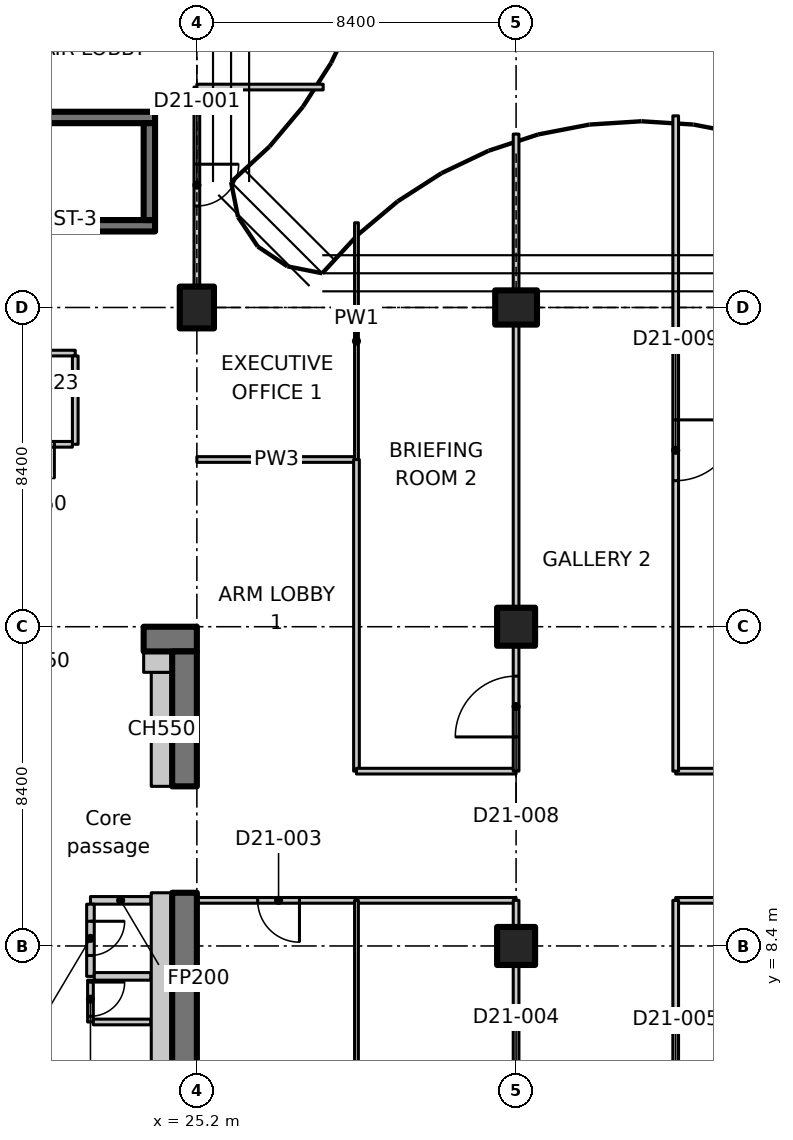
"""IFC4 building model, lengths in metres.
Left out: names, types, materials, properties, quantities, classifications, styles, units other than length and angle.
Written with IfcOpenShell. Run it as: python <this file> out.ifc"""

import sys

from ifc_helpers import new_model, si_unit, direction, frame, frame_2d, origin, origin_2d, place, context, subcontext, project, spatial, polyline, rectangle, outline, extrude, element, fill, save


model = new_model("IFC4")
c1 = context("Model", 3, precision=1e-05, world=origin(), true_north=direction((0.0, 1.0)))
c2 = subcontext(c1, "Body", "Model", "MODEL_VIEW")
j1 = project(units=[si_unit("LENGTHUNIT", "METRE"), si_unit("PLANEANGLEUNIT", "RADIAN")], contexts=[c1])
p1 = place(None, origin())
s1 = spatial("IfcSite", under=j1, at=p1, CompositionType="ELEMENT")
p2 = place(p1, origin())
s2 = spatial("IfcBuilding", under=s1, at=p2, CompositionType="ELEMENT")
p3 = place(p2, frame((0.0, 0.0, 170.4)))
s3 = spatial("IfcBuildingStorey", under=s2, at=p3, CompositionType="ELEMENT", Elevation=170.4)
p4 = place(p3, frame((25.2, 25.2, 0.0), z_axis=(0.0, 0.0, 1.0), x_axis=(1.0, 0.0, 0.0)))
e1 = element("IfcColumn", 1, at=p4, inside=s3, PredefinedType="COLUMN", context=c2, shape_type="SweptSolid", body=[
    extrude(rectangle(XDim=0.9, YDim=1.1, at=origin_2d()), origin(), (0.0, 0.0, 1.0), 3.35),
])
for number, where, z_axis, x_axis in (
    (2, (33.6, 8.4, 0.0), (0.0, 0.0, 1.0), (1.0, 0.0, 0.0)),
    (3, (33.6, 16.8, 0.0), (0.0, 0.0, 1.0), (1.0, 0.0, 0.0)),
):
    element("IfcColumn", number, at=place(p3, frame(where, z_axis=z_axis, x_axis=x_axis)), inside=s3, PredefinedType="COLUMN", context=c2, shape_type="SweptSolid", body=[
        extrude(rectangle(XDim=1.0, YDim=1.0, at=origin_2d()), origin(), (0.0, 0.0, 1.0), 3.35),
    ])
p5 = place(p3, frame((33.6, 25.2, 0.0), z_axis=(0.0, 0.0, 1.0), x_axis=(0.0, 1.0, 0.0)))
e4 = element("IfcColumn", 4, at=p5, inside=s3, PredefinedType="COLUMN", context=c2, shape_type="SweptSolid", body=[
    extrude(rectangle(XDim=0.9, YDim=1.1, at=origin_2d()), origin(), (0.0, 0.0, 1.0), 3.35),
])
p6 = place(p3, frame((23.8, 16.475, 0.0), z_axis=(0.0, 0.0, 1.0), x_axis=(1.0, 0.0, 0.0)))
e5 = element("IfcWall", 5, at=p6, inside=s3, PredefinedType="SHEAR", context=c2, shape_type="SweptSolid", body=[
    extrude(rectangle(XDim=1.4, YDim=0.65, at=frame_2d((0.7, 0.0))), origin(), (0.0, 0.0, 1.0), 3.35),
])
p7 = place(p3, frame((24.875, 0.65, 0.0), z_axis=(0.0, 0.0, 1.0), x_axis=(0.0, 1.0, 0.0)))
e6 = element("IfcWall", 6, at=p7, inside=s3, PredefinedType="SHEAR", context=c2, shape_type="SweptSolid", body=[
    extrude(rectangle(XDim=9.15, YDim=0.65, at=frame_2d((4.575, 0.0))), origin(), (0.0, 0.0, 1.0), 3.35),
])
p8 = place(p3, frame((24.875, 12.6, 0.0), z_axis=(0.0, 0.0, 1.0), x_axis=(0.0, 1.0, 0.0)))
e7 = element("IfcWall", 7, at=p8, inside=s3, PredefinedType="SHEAR", context=c2, shape_type="SweptSolid", body=[
    extrude(rectangle(XDim=3.55, YDim=0.65, at=frame_2d((1.775, 0.0))), origin(), (0.0, 0.0, 1.0), 3.35),
])
p9 = place(p3, frame((24.275, 12.6, 0.0), z_axis=(0.0, 0.0, 1.0), x_axis=(0.0, 1.0, 0.0)))
e8 = element("IfcWall", 8, at=p9, inside=s3, PredefinedType="PARTITIONING", context=c2, shape_type="SweptSolid", body=[
    extrude(rectangle(XDim=3.0, YDim=0.55, at=frame_2d((1.5, 0.0))), origin(), (0.0, 0.0, 1.0), 3.35),
])
p10 = place(p3, frame((23.8, 15.875, 0.0), z_axis=(0.0, 0.0, 1.0), x_axis=(1.0, 0.0, 0.0)))
e9 = element("IfcWall", 9, at=p10, inside=s3, PredefinedType="PARTITIONING", context=c2, shape_type="SweptSolid", body=[
    extrude(rectangle(XDim=0.75, YDim=0.55, at=frame_2d((0.375, 0.0))), origin(), (0.0, 0.0, 1.0), 3.35),
])
for number, where, z_axis, x_axis in (
    (10, (15.9, 27.35, 0.0), (0.0, 0.0, 1.0), (1.0, 0.0, 0.0)),
    (11, (15.9, 30.2, 0.0), (0.0, 0.0, 1.0), (1.0, 0.0, 0.0)),
):
    element("IfcWall", number, at=place(p3, frame(where, z_axis=z_axis, x_axis=x_axis)), inside=s3, PredefinedType="SHEAR", context=c2, shape_type="SweptSolid", body=[
        extrude(rectangle(XDim=8.2, YDim=0.3, at=frame_2d((4.1, 0.0))), origin(), (0.0, 0.0, 1.0), 3.35),
    ])
p11 = place(p3, frame((23.95, 27.5, 0.0), z_axis=(0.0, 0.0, 1.0), x_axis=(0.0, 1.0, 0.0)))
e12 = element("IfcWall", 12, at=p11, inside=s3, PredefinedType="SHEAR", context=c2, shape_type="SweptSolid", body=[
    extrude(rectangle(XDim=2.55, YDim=0.3, at=frame_2d((1.275, 0.0))), origin(), (0.0, 0.0, 1.0), 3.35),
])
p12 = place(p3, frame((23.988, 9.6, 0.0), z_axis=(0.0, 0.0, 1.0), x_axis=(-1.0, 0.0, 0.0)))
e13 = element("IfcWall", 13, at=p12, inside=s3, PredefinedType="PARTITIONING", context=c2, shape_type="SweptSolid", body=[
    extrude(rectangle(XDim=1.588, YDim=0.2, at=frame_2d((0.794, 0.0))), origin(), (0.0, 0.0, 1.0), 3.35),
])
p13 = place(p3, frame((22.4, 9.5, 0.0), z_axis=(0.0, 0.0, 1.0), x_axis=(0.0, -1.0, 0.0)))
e14 = element("IfcWall", 14, at=p13, inside=s3, PredefinedType="PARTITIONING", context=c2, shape_type="SweptSolid", body=[
    extrude(rectangle(XDim=1.9, YDim=0.2, at=frame_2d((0.95, 0.0))), origin(), (0.0, 0.0, 1.0), 3.35),
])
p14 = place(p13, frame((0.45, 0.0, 0.0)))
e15 = element("IfcOpeningElement", 15, at=p14, cuts=e14, PredefinedType="OPENING", context=c2, shape_type="SweptSolid", body=[
    extrude(rectangle(XDim=0.9, YDim=2.1, at=frame_2d((0.45, 1.05))), frame((0.0, 0.11, 0.0), z_axis=(0.0, -1.0, 0.0), x_axis=(1.0, 0.0, 0.0)), (0.0, 0.0, 1.0), 0.22),
])
p15 = place(p3, frame((22.5, 7.6, 0.0), z_axis=(0.0, 0.0, 1.0), x_axis=(1.0, 0.0, 0.0)))
e16 = element("IfcWall", 16, at=p15, inside=s3, PredefinedType="PARTITIONING", context=c2, shape_type="SweptSolid", body=[
    extrude(rectangle(XDim=1.488, YDim=0.2, at=frame_2d((0.744, 0.0))), origin(), (0.0, 0.0, 1.0), 3.35),
])
p16 = place(p3, frame((20.0, 24.0, 0.0), z_axis=(0.0, 0.0, 1.0), x_axis=(1.0, 0.0, 0.0)))
e17 = element("IfcWall", 17, at=p16, inside=s3, PredefinedType="PARTITIONING", context=c2, shape_type="SweptSolid", body=[
    extrude(rectangle(XDim=2.0, YDim=0.15, at=frame_2d((1.0, 0.0))), origin(), (0.0, 0.0, 1.0), 3.35),
])
p17 = place(p3, frame((22.0, 23.925, 0.0), z_axis=(0.0, 0.0, 1.0), x_axis=(0.0, -1.0, 0.0)))
e18 = element("IfcWall", 18, at=p17, inside=s3, PredefinedType="PARTITIONING", context=c2, shape_type="SweptSolid", body=[
    extrude(rectangle(XDim=2.325, YDim=0.15, at=frame_2d((1.163, 0.0))), origin(), (0.0, 0.0, 1.0), 3.35),
])
p18 = place(p3, frame((21.925, 21.6, 0.0), z_axis=(0.0, 0.0, 1.0), x_axis=(-1.0, 0.0, 0.0)))
e19 = element("IfcWall", 19, at=p18, inside=s3, PredefinedType="PARTITIONING", context=c2, shape_type="SweptSolid", body=[
    extrude(rectangle(XDim=1.925, YDim=0.15, at=frame_2d((0.962, 0.0))), origin(), (0.0, 0.0, 1.0), 3.35),
])
p19 = place(p18, frame((0.475, 0.0, 0.0)))
e20 = element("IfcOpeningElement", 20, at=p19, cuts=e19, PredefinedType="OPENING", context=c2, shape_type="SweptSolid", body=[
    extrude(rectangle(XDim=0.9, YDim=2.1, at=frame_2d((0.45, 1.05))), frame((0.0, 0.085, 0.0), z_axis=(0.0, -1.0, 0.0), x_axis=(1.0, 0.0, 0.0)), (0.0, 0.0, 1.0), 0.17),
])
p20 = place(p3, frame((22.4, 7.5, 0.0), z_axis=(0.0, 0.0, 1.0), x_axis=(0.0, -1.0, 0.0)))
e21 = element("IfcWall", 21, at=p20, inside=s3, PredefinedType="PARTITIONING", context=c2, shape_type="SweptSolid", body=[
    extrude(rectangle(XDim=1.1, YDim=0.15, at=frame_2d((0.55, 0.0))), origin(), (0.0, 0.0, 1.0), 3.35),
])
p21 = place(p20, frame((0.05, 0.0, 0.0)))
e22 = element("IfcOpeningElement", 22, at=p21, cuts=e21, PredefinedType="OPENING", context=c2, shape_type="SweptSolid", body=[
    extrude(rectangle(XDim=0.9, YDim=2.1, at=frame_2d((0.45, 1.05))), frame((0.0, 0.085, 0.0), z_axis=(0.0, -1.0, 0.0), x_axis=(1.0, 0.0, 0.0)), (0.0, 0.0, 1.0), 0.17),
])
p22 = place(p3, frame((22.475, 6.4, 0.0), z_axis=(0.0, 0.0, 1.0), x_axis=(1.0, 0.0, 0.0)))
e23 = element("IfcWall", 23, at=p22, inside=s3, PredefinedType="PARTITIONING", context=c2, shape_type="SweptSolid", body=[
    extrude(rectangle(XDim=1.513, YDim=0.15, at=frame_2d((0.756, 0.0))), origin(), (0.0, 0.0, 1.0), 3.35),
])
p23 = place(p3, frame((24.275, 4.35, 0.0), z_axis=(0.0, 0.0, 1.0), x_axis=(0.0, 1.0, 0.0)))
e24 = element("IfcWall", 24, at=p23, inside=s3, PredefinedType="PARTITIONING", context=c2, shape_type="SweptSolid", body=[
    extrude(rectangle(XDim=5.45, YDim=0.55, at=frame_2d((2.725, 0.0))), origin(), (0.0, 0.0, 1.0), 3.35),
])
p24 = place(p3, frame((25.2, 21.2, 0.0), z_axis=(0.0, 0.0, 1.0), x_axis=(1.0, 0.0, 0.0)))
e25 = element("IfcWall", 25, at=p24, inside=s3, PredefinedType="PARTITIONING", context=c2, shape_type="SweptSolid", body=[
    extrude(rectangle(XDim=4.2, YDim=0.15, at=frame_2d((2.1, 0.0))), origin(), (0.0, 0.0, 1.0), 3.33),
])
p25 = place(p3, frame((29.4, 9.6, 0.0), z_axis=(0.0, 0.0, 1.0), x_axis=(-1.0, 0.0, 0.0)))
e26 = element("IfcWall", 26, at=p25, inside=s3, PredefinedType="PARTITIONING", context=c2, shape_type="SweptSolid", body=[
    extrude(rectangle(XDim=4.2, YDim=0.15, at=frame_2d((2.1, 0.0))), origin(), (0.0, 0.0, 1.0), 3.33),
])
p26 = place(p25, frame((1.5, 0.0, 0.0)))
e27 = element("IfcOpeningElement", 27, at=p26, cuts=e26, PredefinedType="OPENING", context=c2, shape_type="SweptSolid", body=[
    extrude(rectangle(XDim=1.1, YDim=2.1, at=frame_2d((0.55, 1.05))), frame((0.0, 0.085, 0.0), z_axis=(0.0, -1.0, 0.0), x_axis=(1.0, 0.0, 0.0)), (0.0, 0.0, 1.0), 0.17),
])
p27 = place(p3, frame((29.4, 21.2, 0.0), z_axis=(0.0, 0.0, 1.0), x_axis=(0.0, -1.0, 0.0)))
e28 = element("IfcWall", 28, at=p27, inside=s3, PredefinedType="PARTITIONING", context=c2, shape_type="SweptSolid", body=[
    extrude(rectangle(XDim=8.2, YDim=0.15, at=frame_2d((4.1, 0.0))), origin(), (0.0, 0.0, 1.0), 3.33),
])
p28 = place(p3, frame((29.4, 27.429, 0.0), z_axis=(0.0, 0.0, 1.0), x_axis=(0.0, -1.0, 0.0)))
e29 = element("IfcWall", 29, at=p28, inside=s3, PredefinedType="PARTITIONING", context=c2, shape_type="SweptSolid", body=[
    extrude(outline(polyline([(0.0, 0.0), (6.229, 0.0), (6.229, 3.33), (2.679, 3.33), (2.677, 2.98), (1.781, 2.98), (1.779, 3.33), (0.154, 3.33), (0.0, 3.33), (0.0, 0.0)])), frame((0.0, 0.05, 0.0), z_axis=(0.0, -1.0, 0.0), x_axis=(1.0, 0.0, 0.0)), (0.0, 0.0, 1.0), 0.1),
])
p29 = place(p3, frame((25.2, 31.0, 0.0), z_axis=(0.0, 0.0, 1.0), x_axis=(0.0, -1.0, 0.0)))
e30 = element("IfcWall", 30, at=p29, inside=s3, PredefinedType="PARTITIONING", context=c2, shape_type="SweptSolid", body=[
    extrude(outline(polyline([(0.0, 0.0), (5.23, 0.0), (5.23, 2.98), (0.0, 2.98), (0.0, 0.0)])), frame((0.0, 0.075, 0.0), z_axis=(0.0, -1.0, 0.0), x_axis=(1.0, 0.0, 0.0)), (0.0, 0.0, 1.0), 0.15),
])
p30 = place(p29, frame((2.03, 0.0, 0.0)))
e31 = element("IfcOpeningElement", 31, at=p30, cuts=e30, PredefinedType="OPENING", context=c2, shape_type="SweptSolid", body=[
    extrude(rectangle(XDim=1.1, YDim=2.1, at=frame_2d((0.55, 1.05))), frame((0.0, 0.085, 0.0), z_axis=(0.0, -1.0, 0.0), x_axis=(1.0, 0.0, 0.0)), (0.0, 0.0, 1.0), 0.17),
])
p31 = place(p3, frame((25.2, 31.0, 0.0), z_axis=(0.0, 0.0, 1.0), x_axis=(1.0, 0.0, 0.0)))
e32 = element("IfcWall", 32, at=p31, inside=s3, PredefinedType="PARTITIONING", context=c2, shape_type="SweptSolid", body=[
    extrude(rectangle(XDim=3.324, YDim=0.15, at=frame_2d((1.662, 0.0))), origin(), (0.0, 0.0, 1.0), 2.98),
])
p32 = place(p3, frame((33.6, 9.6, 0.0), z_axis=(0.0, 0.0, 1.0), x_axis=(-1.0, 0.0, 0.0)))
e33 = element("IfcWall", 33, at=p32, inside=s3, PredefinedType="PARTITIONING", context=c2, shape_type="SweptSolid", body=[
    extrude(rectangle(XDim=4.2, YDim=0.15, at=frame_2d((2.1, 0.0))), origin(), (0.0, 0.0, 1.0), 3.33),
])
p33 = place(p3, frame((42.0, 9.6, 0.0), z_axis=(0.0, 0.0, 1.0), x_axis=(-1.0, 0.0, 0.0)))
e34 = element("IfcWall", 34, at=p33, inside=s3, PredefinedType="PARTITIONING", context=c2, shape_type="SweptSolid", body=[
    extrude(rectangle(XDim=4.2, YDim=0.15, at=frame_2d((2.1, 0.0))), origin(), (0.0, 0.0, 1.0), 3.33),
])
p34 = place(p3, frame((29.4, 13.0, 0.0), z_axis=(0.0, 0.0, 1.0), x_axis=(1.0, 0.0, 0.0)))
e35 = element("IfcWall", 35, at=p34, inside=s3, PredefinedType="PARTITIONING", context=c2, shape_type="SweptSolid", body=[
    extrude(rectangle(XDim=4.2, YDim=0.15, at=frame_2d((2.1, 0.0))), origin(), (0.0, 0.0, 1.0), 3.33),
])
p35 = place(p3, frame((37.8, 13.0, 0.0), z_axis=(0.0, 0.0, 1.0), x_axis=(1.0, 0.0, 0.0)))
e36 = element("IfcWall", 36, at=p35, inside=s3, PredefinedType="PARTITIONING", context=c2, shape_type="SweptSolid", body=[
    extrude(rectangle(XDim=3.4, YDim=0.15, at=frame_2d((1.7, 0.0))), origin(), (0.0, 0.0, 1.0), 3.33),
])
p36 = place(p3, frame((33.6, 0.47, 0.0), z_axis=(0.0, 0.0, 1.0), x_axis=(0.0, 1.0, 0.0)))
e37 = element("IfcWall", 37, at=p36, inside=s3, PredefinedType="PARTITIONING", context=c2, shape_type="SweptSolid", body=[
    extrude(rectangle(XDim=7.41, YDim=0.15, at=frame_2d((3.705, 0.0))), origin(), (0.0, 0.0, 1.0), 3.33),
])
p37 = place(p36, frame((3.3, 0.0, 0.0)))
e38 = element("IfcOpeningElement", 38, at=p37, cuts=e37, PredefinedType="OPENING", context=c2, shape_type="SweptSolid", body=[
    extrude(rectangle(XDim=1.1, YDim=2.1, at=frame_2d((0.55, 1.05))), frame((0.0, 0.085, 0.0), z_axis=(0.0, -1.0, 0.0), x_axis=(1.0, 0.0, 0.0)), (0.0, 0.0, 1.0), 0.17),
])
p38 = place(p3, frame((33.6, 8.92, 0.0), z_axis=(0.0, 0.0, 1.0), x_axis=(0.0, 1.0, 0.0)))
e39 = element("IfcWall", 39, at=p38, inside=s3, PredefinedType="PARTITIONING", context=c2, shape_type="SweptSolid", body=[
    extrude(rectangle(XDim=0.68, YDim=0.15, at=frame_2d((0.34, 0.0))), origin(), (0.0, 0.0, 1.0), 3.33),
])
p39 = place(p3, frame((37.8, 9.6, 0.0), z_axis=(0.0, 0.0, 1.0), x_axis=(0.0, -1.0, 0.0)))
e40 = element("IfcWall", 40, at=p39, inside=s3, PredefinedType="PARTITIONING", context=c2, shape_type="SweptSolid", body=[
    extrude(outline(polyline([(0.0, 0.0), (10.965, 0.0), (10.965, 3.33), (10.7, 3.33), (10.05, 3.33), (10.048, 2.98), (9.152, 2.98), (9.15, 3.33), (0.0, 3.33), (0.0, 0.0)])), frame((0.0, 0.075, 0.0), z_axis=(0.0, -1.0, 0.0), x_axis=(1.0, 0.0, 0.0)), (0.0, 0.0, 1.0), 0.15),
])
p40 = place(p39, frame((4.8, 0.0, 0.0)))
e41 = element("IfcOpeningElement", 41, at=p40, cuts=e40, PredefinedType="OPENING", context=c2, shape_type="SweptSolid", body=[
    extrude(rectangle(XDim=1.1, YDim=2.1, at=frame_2d((0.55, 1.05))), frame((0.0, 0.085, 0.0), z_axis=(0.0, -1.0, 0.0), x_axis=(1.0, 0.0, 0.0)), (0.0, 0.0, 1.0), 0.17),
])
p41 = place(p3, frame((29.4, 9.6, 0.0), z_axis=(0.0, 0.0, 1.0), x_axis=(0.0, -1.0, 0.0)))
e42 = element("IfcWall", 42, at=p41, inside=s3, PredefinedType="PARTITIONING", context=c2, shape_type="SweptSolid", body=[
    extrude(outline(polyline([(0.0, 0.0), (10.965, 0.0), (10.965, 3.33), (10.7, 3.33), (10.05, 3.33), (10.048, 2.98), (9.152, 2.98), (9.15, 3.33), (0.0, 3.33), (0.0, 0.0)])), frame((0.0, 0.05, 0.0), z_axis=(0.0, -1.0, 0.0), x_axis=(1.0, 0.0, 0.0)), (0.0, 0.0, 1.0), 0.1),
])
p42 = place(p3, frame((33.6, 13.0, 0.0), z_axis=(0.0, 0.0, 1.0), x_axis=(0.0, 1.0, 0.0)))
e43 = element("IfcWall", 43, at=p42, inside=s3, PredefinedType="PARTITIONING", context=c2, shape_type="SweptSolid", body=[
    extrude(rectangle(XDim=3.28, YDim=0.15, at=frame_2d((1.64, 0.0))), origin(), (0.0, 0.0, 1.0), 3.33),
])
p43 = place(p42, frame((0.9, 0.0, 0.0)))
e44 = element("IfcOpeningElement", 44, at=p43, cuts=e43, PredefinedType="OPENING", context=c2, shape_type="SweptSolid", body=[
    extrude(rectangle(XDim=1.6, YDim=2.1, at=frame_2d((0.8, 1.05))), frame((0.0, 0.085, 0.0), z_axis=(0.0, -1.0, 0.0), x_axis=(1.0, 0.0, 0.0)), (0.0, 0.0, 1.0), 0.17),
])
p44 = place(p3, frame((33.6, 17.32, 0.0), z_axis=(0.0, 0.0, 1.0), x_axis=(0.0, 1.0, 0.0)))
e45 = element("IfcWall", 45, at=p44, inside=s3, PredefinedType="PARTITIONING", context=c2, shape_type="SweptSolid", body=[
    extrude(rectangle(XDim=7.41, YDim=0.15, at=frame_2d((3.705, 0.0))), origin(), (0.0, 0.0, 1.0), 3.33),
])
p45 = place(p3, frame((33.6, 25.67, 0.0), z_axis=(0.0, 0.0, 1.0), x_axis=(0.0, 1.0, 0.0)))
e46 = element("IfcWall", 46, at=p45, inside=s3, PredefinedType="PARTITIONING", context=c2, shape_type="SweptSolid", body=[
    extrude(rectangle(XDim=4.092, YDim=0.15, at=frame_2d((2.046, 0.0))), origin(), (0.0, 0.0, 1.0), 2.98),
])
p46 = place(p3, frame((37.8, 30.243, 0.0), z_axis=(0.0, 0.0, 1.0), x_axis=(0.0, -1.0, 0.0)))
e47 = element("IfcWall", 47, at=p46, inside=s3, PredefinedType="PARTITIONING", context=c2, shape_type="SweptSolid", body=[
    extrude(outline(polyline([(0.0, 0.0), (17.243, 0.0), (17.243, 3.33), (5.493, 3.33), (5.491, 2.98), (4.595, 2.98), (4.593, 3.33), (0.0, 3.33), (0.0, 0.0)])), frame((0.0, 0.075, 0.0), z_axis=(0.0, -1.0, 0.0), x_axis=(1.0, 0.0, 0.0)), (0.0, 0.0, 1.0), 0.15),
])
p47 = place(p46, frame((8.0, 0.0, 0.0)))
e48 = element("IfcOpeningElement", 48, at=p47, cuts=e47, PredefinedType="OPENING", context=c2, shape_type="SweptSolid", body=[
    extrude(rectangle(XDim=1.6, YDim=2.1, at=frame_2d((0.8, 1.05))), frame((0.0, 0.085, 0.0), z_axis=(0.0, -1.0, 0.0), x_axis=(1.0, 0.0, 0.0)), (0.0, 0.0, 1.0), 0.17),
])
p48 = place(p21, origin())
e49 = element("IfcDoor", 49, at=p48, inside=s3, OperationType="SINGLE_SWING_RIGHT", PredefinedType="DOOR", context=c2, shape_type="SweptSolid", body=[
    extrude(rectangle(XDim=0.9, YDim=2.1, at=frame_2d((0.45, 1.05))), frame((0.0, 0.025, 0.0), z_axis=(0.0, -1.0, 0.0), x_axis=(1.0, 0.0, 0.0)), (0.0, 0.0, 1.0), 0.05),
])
fill(e22, e49)
p49 = place(p14, origin())
e50 = element("IfcDoor", 50, at=p49, inside=s3, OperationType="SINGLE_SWING_LEFT", PredefinedType="DOOR", context=c2, shape_type="SweptSolid", body=[
    extrude(rectangle(XDim=0.9, YDim=2.1, at=frame_2d((0.45, 1.05))), frame((0.0, 0.025, 0.0), z_axis=(0.0, -1.0, 0.0), x_axis=(1.0, 0.0, 0.0)), (0.0, 0.0, 1.0), 0.05),
])
fill(e15, e50)
p50 = place(p19, origin())
e51 = element("IfcDoor", 51, at=p50, inside=s3, OperationType="SINGLE_SWING_RIGHT", PredefinedType="DOOR", context=c2, shape_type="SweptSolid", body=[
    extrude(rectangle(XDim=0.9, YDim=2.1, at=frame_2d((0.45, 1.05))), frame((0.0, 0.025, 0.0), z_axis=(0.0, -1.0, 0.0), x_axis=(1.0, 0.0, 0.0)), (0.0, 0.0, 1.0), 0.05),
])
fill(e20, e51)
p51 = place(p30, origin())
e52 = element("IfcDoor", 52, at=p51, inside=s3, OperationType="SINGLE_SWING_RIGHT", PredefinedType="DOOR", context=c2, shape_type="SweptSolid", body=[
    extrude(rectangle(XDim=1.1, YDim=2.1, at=frame_2d((0.55, 1.05))), frame((0.0, 0.025, 0.0), z_axis=(0.0, -1.0, 0.0), x_axis=(1.0, 0.0, 0.0)), (0.0, 0.0, 1.0), 0.05),
])
fill(e31, e52)
p52 = place(p26, origin())
e53 = element("IfcDoor", 53, at=p52, inside=s3, OperationType="SINGLE_SWING_LEFT", PredefinedType="DOOR", context=c2, shape_type="SweptSolid", body=[
    extrude(rectangle(XDim=1.1, YDim=2.1, at=frame_2d((0.55, 1.05))), frame((0.0, 0.025, 0.0), z_axis=(0.0, -1.0, 0.0), x_axis=(1.0, 0.0, 0.0)), (0.0, 0.0, 1.0), 0.05),
])
fill(e27, e53)
p53 = place(p43, origin())
e54 = element("IfcDoor", 54, at=p53, inside=s3, OperationType="DOUBLE_DOOR_SINGLE_SWING", PredefinedType="DOOR", context=c2, shape_type="SweptSolid", body=[
    extrude(rectangle(XDim=1.6, YDim=2.1, at=frame_2d((0.8, 1.05))), frame((0.0, 0.025, 0.0), z_axis=(0.0, -1.0, 0.0), x_axis=(1.0, 0.0, 0.0)), (0.0, 0.0, 1.0), 0.05),
])
fill(e44, e54)
p54 = place(p47, origin())
e55 = element("IfcDoor", 55, at=p54, inside=s3, OperationType="DOUBLE_DOOR_SINGLE_SWING", PredefinedType="DOOR", context=c2, shape_type="SweptSolid", body=[
    extrude(rectangle(XDim=1.6, YDim=2.1, at=frame_2d((0.8, 1.05))), frame((0.0, 0.025, 0.0), z_axis=(0.0, -1.0, 0.0), x_axis=(1.0, 0.0, 0.0)), (0.0, 0.0, 1.0), 0.05),
])
fill(e48, e55)
save(model, sys.argv[1])
